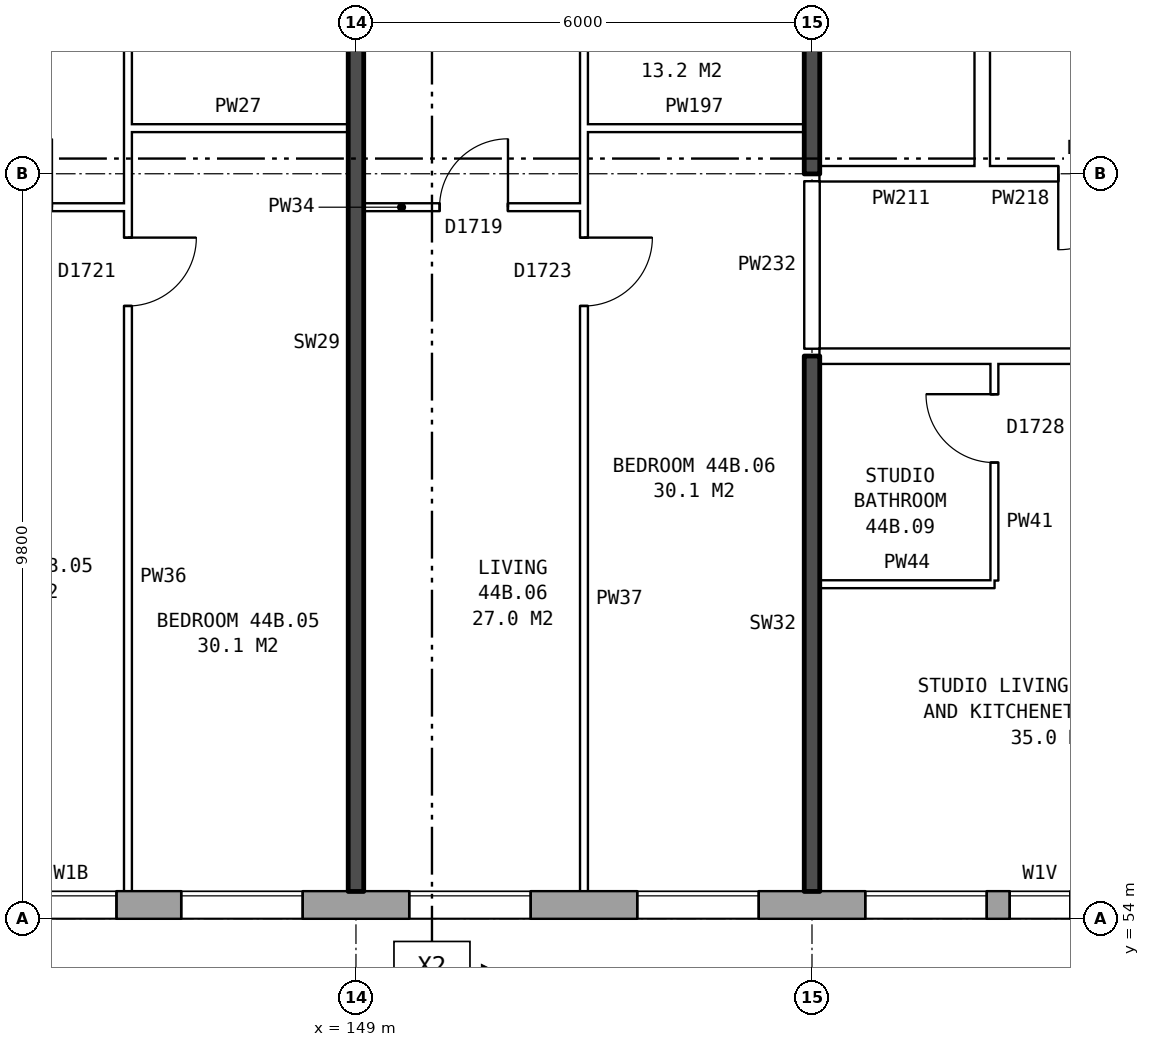
"""IFC4 building model, lengths in metres.
Left out: names, types, materials, properties, quantities, classifications, styles, units other than length and angle.
Written with IfcOpenShell. Run it as: python <this file> out.ifc"""

import sys

from ifc_helpers import new_model, si_unit, direction, frame, frame_2d, origin, place, context, subcontext, project, spatial, rectangle, extrude, element, fill, save


model = new_model("IFC4")
c1 = context("Model", 3, precision=1e-05, world=origin(), true_north=direction((0.0, 1.0)))
c2 = subcontext(c1, "Body", "Model", "MODEL_VIEW")
j1 = project(units=[si_unit("LENGTHUNIT", "METRE"), si_unit("PLANEANGLEUNIT", "RADIAN")], contexts=[c1])
p1 = place(None, origin())
s1 = spatial("IfcSite", under=j1, at=p1, CompositionType="ELEMENT")
p2 = place(p1, origin())
s2 = spatial("IfcBuilding", under=s1, at=p2, CompositionType="ELEMENT")
p3 = place(p2, frame((0.0, 0.0, 157.8)))
s3 = spatial("IfcBuildingStorey", under=s2, at=p3, CompositionType="ELEMENT", Elevation=157.8)
p4 = place(p3, frame((134.075, 54.18, 0.0), z_axis=(0.0, 0.0, 1.0), x_axis=(1.0, 0.0, 0.0)))
e1 = element("IfcWall", 1, at=p4, inside=s3, PredefinedType="STANDARD", context=c2, shape_type="SweptSolid", body=[
    extrude(rectangle(XDim=34.351, YDim=0.36, at=frame_2d((17.175, 0.0))), origin(), (0.0, 0.0, 1.0), 2.85),
])
p5 = place(p4, frame((0.625, 0.0, 0.8)))
e2 = element("IfcOpeningElement", 2, at=p5, cuts=e1, PredefinedType="OPENING", context=c2, shape_type="SweptSolid", body=[
    extrude(rectangle(XDim=1.6, YDim=1.8, at=frame_2d((0.8, 0.9))), frame((0.0, 0.19, 0.0), z_axis=(0.0, -1.0, 0.0), x_axis=(1.0, 0.0, 0.0)), (0.0, 0.0, 1.0), 0.38),
])
p6 = place(p4, frame((3.625, 0.0, 0.8)))
e3 = element("IfcOpeningElement", 3, at=p6, cuts=e1, PredefinedType="OPENING", context=c2, shape_type="SweptSolid", body=[
    extrude(rectangle(XDim=1.6, YDim=1.8, at=frame_2d((0.8, 0.9))), frame((0.0, 0.19, 0.0), z_axis=(0.0, -1.0, 0.0), x_axis=(1.0, 0.0, 0.0)), (0.0, 0.0, 1.0), 0.38),
])
p7 = place(p4, frame((5.525, 0.0, 0.8)))
e4 = element("IfcOpeningElement", 4, at=p7, cuts=e1, PredefinedType="OPENING", context=c2, shape_type="SweptSolid", body=[
    extrude(rectangle(XDim=1.4, YDim=1.8, at=frame_2d((0.7, 0.9))), frame((0.0, 0.19, 0.0), z_axis=(0.0, -1.0, 0.0), x_axis=(1.0, 0.0, 0.0)), (0.0, 0.0, 1.0), 0.38),
])
p8 = place(p4, frame((9.575, 0.0, 0.45)))
e5 = element("IfcOpeningElement", 5, at=p8, cuts=e1, PredefinedType="OPENING", context=c2, shape_type="SweptSolid", body=[
    extrude(rectangle(XDim=0.6, YDim=0.9, at=frame_2d((0.3, 0.45))), frame((0.0, 0.19, 0.0), z_axis=(0.0, -1.0, 0.0), x_axis=(1.0, 0.0, 0.0)), (0.0, 0.0, 1.0), 0.38),
])
p9 = place(p4, frame((12.625, 0.0, 0.8)))
e6 = element("IfcOpeningElement", 6, at=p9, cuts=e1, PredefinedType="OPENING", context=c2, shape_type="SweptSolid", body=[
    extrude(rectangle(XDim=1.6, YDim=1.8, at=frame_2d((0.8, 0.9))), frame((0.0, 0.19, 0.0), z_axis=(0.0, -1.0, 0.0), x_axis=(1.0, 0.0, 0.0)), (0.0, 0.0, 1.0), 0.38),
])
p10 = place(p4, frame((15.625, 0.0, 0.8)))
e7 = element("IfcOpeningElement", 7, at=p10, cuts=e1, PredefinedType="OPENING", context=c2, shape_type="SweptSolid", body=[
    extrude(rectangle(XDim=1.6, YDim=1.8, at=frame_2d((0.8, 0.9))), frame((0.0, 0.19, 0.0), z_axis=(0.0, -1.0, 0.0), x_axis=(1.0, 0.0, 0.0)), (0.0, 0.0, 1.0), 0.38),
])
p11 = place(p4, frame((18.625, 0.0, 0.8)))
e8 = element("IfcOpeningElement", 8, at=p11, cuts=e1, PredefinedType="OPENING", context=c2, shape_type="SweptSolid", body=[
    extrude(rectangle(XDim=1.6, YDim=1.8, at=frame_2d((0.8, 0.9))), frame((0.0, 0.19, 0.0), z_axis=(0.0, -1.0, 0.0), x_axis=(1.0, 0.0, 0.0)), (0.0, 0.0, 1.0), 0.38),
])
p12 = place(p4, frame((21.625, 0.0, 0.8)))
e9 = element("IfcOpeningElement", 9, at=p12, cuts=e1, PredefinedType="OPENING", context=c2, shape_type="SweptSolid", body=[
    extrude(rectangle(XDim=1.6, YDim=1.8, at=frame_2d((0.8, 0.9))), frame((0.0, 0.19, 0.0), z_axis=(0.0, -1.0, 0.0), x_axis=(1.0, 0.0, 0.0)), (0.0, 0.0, 1.0), 0.38),
])
p13 = place(p4, frame((23.525, 0.0, 0.8)))
e10 = element("IfcOpeningElement", 10, at=p13, cuts=e1, PredefinedType="OPENING", context=c2, shape_type="SweptSolid", body=[
    extrude(rectangle(XDim=0.8, YDim=0.9, at=frame_2d((0.4, 0.45))), frame((0.0, 0.19, 0.0), z_axis=(0.0, -1.0, 0.0), x_axis=(1.0, 0.0, 0.0)), (0.0, 0.0, 1.0), 0.38),
])
p14 = place(p4, frame((27.625, 0.0, 0.8)))
e11 = element("IfcOpeningElement", 11, at=p14, cuts=e1, PredefinedType="OPENING", context=c2, shape_type="SweptSolid", body=[
    extrude(rectangle(XDim=1.6, YDim=1.8, at=frame_2d((0.8, 0.9))), frame((0.0, 0.19, 0.0), z_axis=(0.0, -1.0, 0.0), x_axis=(1.0, 0.0, 0.0)), (0.0, 0.0, 1.0), 0.38),
])
p15 = place(p4, frame((30.625, 0.0, 0.8)))
e12 = element("IfcOpeningElement", 12, at=p15, cuts=e1, PredefinedType="OPENING", context=c2, shape_type="SweptSolid", body=[
    extrude(rectangle(XDim=1.6, YDim=1.8, at=frame_2d((0.8, 0.9))), frame((0.0, 0.19, 0.0), z_axis=(0.0, -1.0, 0.0), x_axis=(1.0, 0.0, 0.0)), (0.0, 0.0, 1.0), 0.38),
])
p16 = place(p4, frame((7.225, 0.0, 1.0)))
e13 = element("IfcOpeningElement", 13, at=p16, cuts=e1, PredefinedType="OPENING", context=c2, shape_type="SweptSolid", body=[
    extrude(rectangle(XDim=0.8, YDim=1.5, at=frame_2d((0.4, 0.75))), frame((0.0, 0.19, 0.0), z_axis=(0.0, -1.0, 0.0), x_axis=(1.0, 0.0, 0.0)), (0.0, 0.0, 1.0), 0.38),
])
p17 = place(p4, frame((10.575, 0.0, 0.45)))
e14 = element("IfcOpeningElement", 14, at=p17, cuts=e1, PredefinedType="OPENING", context=c2, shape_type="SweptSolid", body=[
    extrude(rectangle(XDim=1.2, YDim=1.8, at=frame_2d((0.6, 0.9))), frame((0.0, 0.19, 0.0), z_axis=(0.0, -1.0, 0.0), x_axis=(1.0, 0.0, 0.0)), (0.0, 0.0, 1.0), 0.38),
])
p18 = place(p4, frame((25.525, 0.0, 1.7)))
e15 = element("IfcOpeningElement", 15, at=p18, cuts=e1, PredefinedType="OPENING", context=c2, shape_type="SweptSolid", body=[
    extrude(rectangle(XDim=1.2, YDim=0.9, at=frame_2d((0.6, 0.45))), frame((0.0, 0.19, 0.0), z_axis=(0.0, -1.0, 0.0), x_axis=(1.0, 0.0, 0.0)), (0.0, 0.0, 1.0), 0.38),
])
p19 = place(p3, frame((157.24, 63.9, 0.0), z_axis=(0.0, 0.0, 1.0), x_axis=(0.0, 1.0, 0.0)))
e16 = element("IfcWall", 16, at=p19, inside=s3, PredefinedType="PARTITIONING", context=c2, shape_type="SweptSolid", body=[
    extrude(rectangle(XDim=12.2, YDim=0.2, at=frame_2d((6.1, 0.0))), origin(), (0.0, 0.0, 1.0), 2.85),
])
p20 = place(p19, frame((5.1, 0.0, 0.0)))
e17 = element("IfcOpeningElement", 17, at=p20, cuts=e16, PredefinedType="OPENING", context=c2, shape_type="SweptSolid", body=[
    extrude(rectangle(XDim=2.0, YDim=2.1, at=frame_2d((1.0, 1.05))), frame((0.0, 0.11, 0.0), z_axis=(0.0, -1.0, 0.0), x_axis=(1.0, 0.0, 0.0)), (0.0, 0.0, 1.0), 0.22),
])
p21 = place(p3, frame((155.1, 58.4, 0.0), z_axis=(0.0, 0.0, 1.0), x_axis=(1.0, 0.0, 0.0)))
e18 = element("IfcWall", 18, at=p21, inside=s3, PredefinedType="PARTITIONING", context=c2, shape_type="SweptSolid", body=[
    extrude(rectangle(XDim=2.3, YDim=0.1, at=frame_2d((1.15, 0.0))), origin(), (0.0, 0.0, 1.0), 2.85),
])
p22 = place(p3, frame((155.1, 61.4, 0.0), z_axis=(0.0, 0.0, 1.0), x_axis=(1.0, 0.0, 0.0)))
e19 = element("IfcWall", 19, at=p22, inside=s3, PredefinedType="PARTITIONING", context=c2, shape_type="SweptSolid", body=[
    extrude(rectangle(XDim=16.04, YDim=0.2, at=frame_2d((8.02, 0.0))), origin(), (0.0, 0.0, 1.0), 2.85),
])
p23 = place(p22, frame((3.6, 0.0, 0.0)))
e20 = element("IfcOpeningElement", 20, at=p23, cuts=e19, PredefinedType="OPENING", context=c2, shape_type="SweptSolid", body=[
    extrude(rectangle(XDim=1.0, YDim=2.1, at=frame_2d((0.5, 1.05))), frame((0.0, 0.11, 0.0), z_axis=(0.0, -1.0, 0.0), x_axis=(1.0, 0.0, 0.0)), (0.0, 0.0, 1.0), 0.22),
])
p24 = place(p22, frame((8.4, 0.0, 0.0)))
e21 = element("IfcOpeningElement", 21, at=p24, cuts=e19, PredefinedType="OPENING", context=c2, shape_type="SweptSolid", body=[
    extrude(rectangle(XDim=1.0, YDim=2.1, at=frame_2d((0.5, 1.05))), frame((0.0, 0.11, 0.0), z_axis=(0.0, -1.0, 0.0), x_axis=(1.0, 0.0, 0.0)), (0.0, 0.0, 1.0), 0.22),
])
p25 = place(p3, frame((143.1, 63.36, 0.0), z_axis=(0.0, 0.0, 1.0), x_axis=(1.0, 0.0, 0.0)))
e22 = element("IfcWall", 22, at=p25, inside=s3, PredefinedType="PARTITIONING", context=c2, shape_type="SweptSolid", body=[
    extrude(rectangle(XDim=2.9, YDim=0.1, at=frame_2d((1.45, 0.0))), origin(), (0.0, 0.0, 1.0), 2.85),
])
p26 = place(p25, frame((1.0, 0.0, 0.0)))
e23 = element("IfcOpeningElement", 23, at=p26, cuts=e22, PredefinedType="OPENING", context=c2, shape_type="SweptSolid", body=[
    extrude(rectangle(XDim=0.9, YDim=2.1, at=frame_2d((0.45, 1.05))), frame((0.0, 0.06, 0.0), z_axis=(0.0, -1.0, 0.0), x_axis=(1.0, 0.0, 0.0)), (0.0, 0.0, 1.0), 0.12),
])
p27 = place(p3, frame((149.1, 63.36, 0.0), z_axis=(0.0, 0.0, 1.0), x_axis=(1.0, 0.0, 0.0)))
e24 = element("IfcWall", 24, at=p27, inside=s3, PredefinedType="PARTITIONING", context=c2, shape_type="SweptSolid", body=[
    extrude(rectangle(XDim=2.9, YDim=0.1, at=frame_2d((1.45, 0.0))), origin(), (0.0, 0.0, 1.0), 2.85),
])
p28 = place(p27, frame((1.0, 0.0, 0.0)))
e25 = element("IfcOpeningElement", 25, at=p28, cuts=e24, PredefinedType="OPENING", context=c2, shape_type="SweptSolid", body=[
    extrude(rectangle(XDim=0.9, YDim=2.1, at=frame_2d((0.45, 1.05))), frame((0.0, 0.06, 0.0), z_axis=(0.0, -1.0, 0.0), x_axis=(1.0, 0.0, 0.0)), (0.0, 0.0, 1.0), 0.12),
])
p29 = place(p3, frame((155.1, 63.8, 0.0), z_axis=(0.0, 0.0, 1.0), x_axis=(1.0, 0.0, 0.0)))
e26 = element("IfcWall", 26, at=p29, inside=s3, PredefinedType="PARTITIONING", context=c2, shape_type="SweptSolid", body=[
    extrude(rectangle(XDim=2.14, YDim=0.2, at=frame_2d((1.07, 0.0))), origin(), (0.0, 0.0, 1.0), 2.85),
])
p30 = place(p3, frame((157.24, 63.8, 0.0), z_axis=(0.0, 0.0, 1.0), x_axis=(1.0, 0.0, 0.0)))
e27 = element("IfcWall", 27, at=p30, inside=s3, PredefinedType="PARTITIONING", context=c2, shape_type="SweptSolid", body=[
    extrude(rectangle(XDim=3.0, YDim=0.2, at=frame_2d((1.5, 0.0))), origin(), (0.0, 0.0, 1.0), 2.85),
])
p31 = place(p30, frame((1.0, 0.0, 0.0)))
e28 = element("IfcOpeningElement", 28, at=p31, cuts=e27, PredefinedType="OPENING", context=c2, shape_type="SweptSolid", body=[
    extrude(rectangle(XDim=1.0, YDim=2.1, at=frame_2d((0.5, 1.05))), frame((0.0, 0.11, 0.0), z_axis=(0.0, -1.0, 0.0), x_axis=(1.0, 0.0, 0.0)), (0.0, 0.0, 1.0), 0.22),
])
for number, where, z_axis, x_axis in (
    (29, (146.0, 64.4, 0.0), (0.0, 0.0, 1.0), (1.0, 0.0, 0.0)),
    (30, (152.0, 64.4, 0.0), (0.0, 0.0, 1.0), (1.0, 0.0, 0.0)),
):
    element("IfcWall", number, at=place(p3, frame(where, z_axis=z_axis, x_axis=x_axis)), inside=s3, PredefinedType="PARTITIONING", context=c2, shape_type="SweptSolid", body=[
        extrude(rectangle(XDim=2.9, YDim=0.1, at=frame_2d((1.45, 0.0))), origin(), (0.0, 0.0, 1.0), 2.85),
    ])
p32 = place(p3, frame((146.0, 54.36, 0.0), z_axis=(0.0, 0.0, 1.0), x_axis=(0.0, 1.0, 0.0)))
e31 = element("IfcWall", 31, at=p32, inside=s3, PredefinedType="PARTITIONING", context=c2, shape_type="SweptSolid", body=[
    extrude(rectangle(XDim=14.34, YDim=0.1, at=frame_2d((7.17, 0.0))), origin(), (0.0, 0.0, 1.0), 2.85),
])
p33 = place(p32, frame((7.7, 0.0, 0.0)))
e32 = element("IfcOpeningElement", 32, at=p33, cuts=e31, PredefinedType="OPENING", context=c2, shape_type="SweptSolid", body=[
    extrude(rectangle(XDim=0.9, YDim=2.1, at=frame_2d((0.45, 1.05))), frame((0.0, 0.06, 0.0), z_axis=(0.0, -1.0, 0.0), x_axis=(1.0, 0.0, 0.0)), (0.0, 0.0, 1.0), 0.12),
])
p34 = place(p32, frame((13.04, 0.0, 0.0)))
e33 = element("IfcOpeningElement", 33, at=p34, cuts=e31, PredefinedType="OPENING", context=c2, shape_type="SweptSolid", body=[
    extrude(rectangle(XDim=0.9, YDim=2.1, at=frame_2d((0.45, 1.05))), frame((0.0, 0.06, 0.0), z_axis=(0.0, -1.0, 0.0), x_axis=(1.0, 0.0, 0.0)), (0.0, 0.0, 1.0), 0.12),
])
p35 = place(p3, frame((149.0, 54.36, 0.0), z_axis=(0.0, 0.0, 1.0), x_axis=(0.0, 1.0, 0.0)))
e34 = element("IfcWall", 34, at=p35, inside=s3, PredefinedType="SOLIDWALL", context=c2, shape_type="SweptSolid", body=[
    extrude(rectangle(XDim=14.44, YDim=0.2, at=frame_2d((7.22, 0.0))), origin(), (0.0, 0.0, 1.0), 2.85),
])
p36 = place(p3, frame((152.0, 54.36, 0.0), z_axis=(0.0, 0.0, 1.0), x_axis=(0.0, 1.0, 0.0)))
e35 = element("IfcWall", 35, at=p36, inside=s3, PredefinedType="PARTITIONING", context=c2, shape_type="SweptSolid", body=[
    extrude(rectangle(XDim=14.34, YDim=0.1, at=frame_2d((7.17, 0.0))), origin(), (0.0, 0.0, 1.0), 2.85),
])
p37 = place(p36, frame((7.7, 0.0, 0.0)))
e36 = element("IfcOpeningElement", 36, at=p37, cuts=e35, PredefinedType="OPENING", context=c2, shape_type="SweptSolid", body=[
    extrude(rectangle(XDim=0.9, YDim=2.1, at=frame_2d((0.45, 1.05))), frame((0.0, 0.06, 0.0), z_axis=(0.0, -1.0, 0.0), x_axis=(1.0, 0.0, 0.0)), (0.0, 0.0, 1.0), 0.12),
])
p38 = place(p36, frame((13.04, 0.0, 0.0)))
e37 = element("IfcOpeningElement", 37, at=p38, cuts=e35, PredefinedType="OPENING", context=c2, shape_type="SweptSolid", body=[
    extrude(rectangle(XDim=0.9, YDim=2.1, at=frame_2d((0.45, 1.05))), frame((0.0, 0.06, 0.0), z_axis=(0.0, -1.0, 0.0), x_axis=(1.0, 0.0, 0.0)), (0.0, 0.0, 1.0), 0.12),
])
p39 = place(p3, frame((155.0, 54.36, 0.0), z_axis=(0.0, 0.0, 1.0), x_axis=(0.0, 1.0, 0.0)))
e38 = element("IfcWall", 38, at=p39, inside=s3, PredefinedType="SOLIDWALL", context=c2, shape_type="SweptSolid", body=[
    extrude(rectangle(XDim=7.04, YDim=0.2, at=frame_2d((3.52, 0.0))), origin(), (0.0, 0.0, 1.0), 2.85),
])
p40 = place(p3, frame((155.0, 61.5, 0.0), z_axis=(0.0, 0.0, 1.0), x_axis=(0.0, 1.0, 0.0)))
e39 = element("IfcWall", 39, at=p40, inside=s3, PredefinedType="PARTITIONING", context=c2, shape_type="SweptSolid", body=[
    extrude(rectangle(XDim=2.2, YDim=0.2, at=frame_2d((1.1, 0.0))), origin(), (0.0, 0.0, 1.0), 2.85),
])
p41 = place(p3, frame((155.0, 63.8, 0.0), z_axis=(0.0, 0.0, 1.0), x_axis=(0.0, 1.0, 0.0)))
e40 = element("IfcWall", 40, at=p41, inside=s3, PredefinedType="SOLIDWALL", context=c2, shape_type="SweptSolid", body=[
    extrude(rectangle(XDim=5.0, YDim=0.2, at=frame_2d((2.5, 0.0))), origin(), (0.0, 0.0, 1.0), 2.85),
])
p42 = place(p3, frame((157.4, 58.45, 0.0), z_axis=(0.0, 0.0, 1.0), x_axis=(0.0, 1.0, 0.0)))
e41 = element("IfcWall", 41, at=p42, inside=s3, PredefinedType="PARTITIONING", context=c2, shape_type="SweptSolid", body=[
    extrude(rectangle(XDim=2.85, YDim=0.1, at=frame_2d((1.425, 0.0))), origin(), (0.0, 0.0, 1.0), 2.85),
])
p43 = place(p42, frame((1.55, 0.0, 0.0)))
e42 = element("IfcOpeningElement", 42, at=p43, cuts=e41, PredefinedType="OPENING", context=c2, shape_type="SweptSolid", body=[
    extrude(rectangle(XDim=0.9, YDim=2.1, at=frame_2d((0.45, 1.05))), frame((0.0, 0.06, 0.0), z_axis=(0.0, -1.0, 0.0), x_axis=(1.0, 0.0, 0.0)), (0.0, 0.0, 1.0), 0.12),
])
p44 = place(p9, origin())
e43 = element("IfcWindow", 43, at=p44, inside=s3, PartitioningType="SINGLE_PANEL", PredefinedType="WINDOW", context=c2, shape_type="SweptSolid", body=[
    extrude(rectangle(XDim=1.6, YDim=1.8, at=frame_2d((0.8, 0.9))), frame((0.0, 0.15, 0.0), z_axis=(0.0, -1.0, 0.0), x_axis=(1.0, 0.0, 0.0)), (0.0, 0.0, 1.0), 0.06),
])
fill(e6, e43)
p45 = place(p10, origin())
e44 = element("IfcWindow", 44, at=p45, inside=s3, PartitioningType="SINGLE_PANEL", PredefinedType="WINDOW", context=c2, shape_type="SweptSolid", body=[
    extrude(rectangle(XDim=1.6, YDim=1.8, at=frame_2d((0.8, 0.9))), frame((0.0, 0.15, 0.0), z_axis=(0.0, -1.0, 0.0), x_axis=(1.0, 0.0, 0.0)), (0.0, 0.0, 1.0), 0.06),
])
fill(e7, e44)
p46 = place(p11, origin())
e45 = element("IfcWindow", 45, at=p46, inside=s3, PartitioningType="SINGLE_PANEL", PredefinedType="WINDOW", context=c2, shape_type="SweptSolid", body=[
    extrude(rectangle(XDim=1.6, YDim=1.8, at=frame_2d((0.8, 0.9))), frame((0.0, 0.15, 0.0), z_axis=(0.0, -1.0, 0.0), x_axis=(1.0, 0.0, 0.0)), (0.0, 0.0, 1.0), 0.06),
])
fill(e8, e45)
p47 = place(p12, origin())
e46 = element("IfcWindow", 46, at=p47, inside=s3, PartitioningType="SINGLE_PANEL", PredefinedType="WINDOW", context=c2, shape_type="SweptSolid", body=[
    extrude(rectangle(XDim=1.6, YDim=1.8, at=frame_2d((0.8, 0.9))), frame((0.0, 0.15, 0.0), z_axis=(0.0, -1.0, 0.0), x_axis=(1.0, 0.0, 0.0)), (0.0, 0.0, 1.0), 0.06),
])
fill(e9, e46)
p48 = place(p13, origin())
e47 = element("IfcWindow", 47, at=p48, inside=s3, PartitioningType="SINGLE_PANEL", PredefinedType="WINDOW", context=c2, shape_type="SweptSolid", body=[
    extrude(rectangle(XDim=0.8, YDim=0.9, at=frame_2d((0.4, 0.45))), frame((0.0, 0.15, 0.0), z_axis=(0.0, -1.0, 0.0), x_axis=(1.0, 0.0, 0.0)), (0.0, 0.0, 1.0), 0.06),
])
fill(e10, e47)
p49 = place(p31, frame((1.0, 0.0, 0.0), z_axis=(0.0, 0.0, 1.0), x_axis=(-1.0, 0.0, 0.0)))
e48 = element("IfcDoor", 48, at=p49, inside=s3, OperationType="SINGLE_SWING_RIGHT", PredefinedType="DOOR", context=c2, shape_type="SweptSolid", body=[
    extrude(rectangle(XDim=1.0, YDim=2.1, at=frame_2d((0.5, 1.05))), frame((0.0, 0.025, 0.0), z_axis=(0.0, -1.0, 0.0), x_axis=(1.0, 0.0, 0.0)), (0.0, 0.0, 1.0), 0.05),
])
fill(e28, e48)
p50 = place(p33, frame((0.9, 0.0, 0.0), z_axis=(0.0, 0.0, 1.0), x_axis=(-1.0, 0.0, 0.0)))
e49 = element("IfcDoor", 49, at=p50, inside=s3, OperationType="SINGLE_SWING_LEFT", PredefinedType="DOOR", context=c2, shape_type="SweptSolid", body=[
    extrude(rectangle(XDim=0.9, YDim=2.1, at=frame_2d((0.45, 1.05))), frame((0.0, 0.025, 0.0), z_axis=(0.0, -1.0, 0.0), x_axis=(1.0, 0.0, 0.0)), (0.0, 0.0, 1.0), 0.05),
])
fill(e32, e49)
p51 = place(p37, frame((0.9, 0.0, 0.0), z_axis=(0.0, 0.0, 1.0), x_axis=(-1.0, 0.0, 0.0)))
e50 = element("IfcDoor", 50, at=p51, inside=s3, OperationType="SINGLE_SWING_LEFT", PredefinedType="DOOR", context=c2, shape_type="SweptSolid", body=[
    extrude(rectangle(XDim=0.9, YDim=2.1, at=frame_2d((0.45, 1.05))), frame((0.0, 0.025, 0.0), z_axis=(0.0, -1.0, 0.0), x_axis=(1.0, 0.0, 0.0)), (0.0, 0.0, 1.0), 0.05),
])
fill(e36, e50)
p52 = place(p28, origin())
e51 = element("IfcDoor", 51, at=p52, inside=s3, OperationType="SINGLE_SWING_RIGHT", PredefinedType="DOOR", context=c2, shape_type="SweptSolid", body=[
    extrude(rectangle(XDim=0.9, YDim=2.1, at=frame_2d((0.45, 1.05))), frame((0.0, 0.025, 0.0), z_axis=(0.0, -1.0, 0.0), x_axis=(1.0, 0.0, 0.0)), (0.0, 0.0, 1.0), 0.05),
])
fill(e25, e51)
p53 = place(p43, origin())
e52 = element("IfcDoor", 52, at=p53, inside=s3, OperationType="SINGLE_SWING_RIGHT", PredefinedType="DOOR", context=c2, shape_type="SweptSolid", body=[
    extrude(rectangle(XDim=0.9, YDim=2.1, at=frame_2d((0.45, 1.05))), frame((0.0, 0.025, 0.0), z_axis=(0.0, -1.0, 0.0), x_axis=(1.0, 0.0, 0.0)), (0.0, 0.0, 1.0), 0.05),
])
fill(e42, e52)
p54 = place(p17, origin())
e53 = element("IfcWindow", 53, at=p54, inside=s3, PartitioningType="SINGLE_PANEL", PredefinedType="WINDOW", context=c2, shape_type="SweptSolid", body=[
    extrude(rectangle(XDim=1.2, YDim=1.8, at=frame_2d((0.6, 0.9))), frame((0.0, 0.15, 0.0), z_axis=(0.0, -1.0, 0.0), x_axis=(1.0, 0.0, 0.0)), (0.0, 0.0, 1.0), 0.06),
])
fill(e14, e53)
save(model, sys.argv[1])
